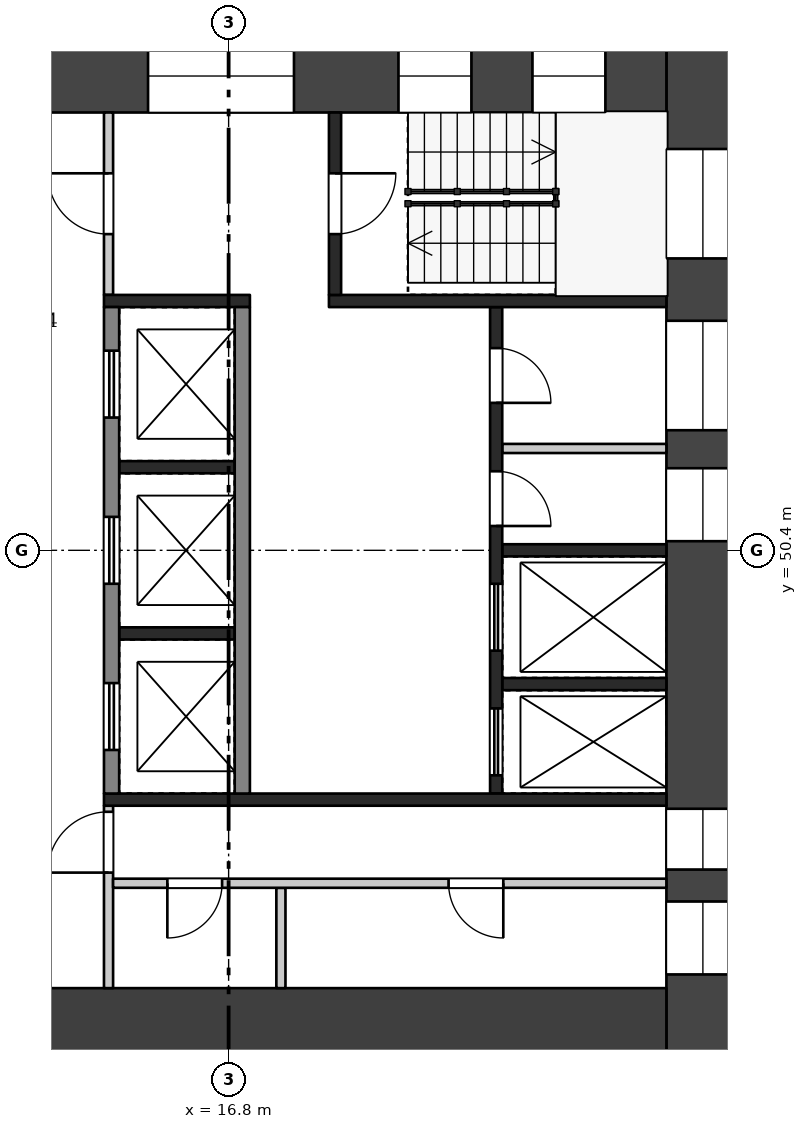
"""IFC4 building model, lengths in metres.
Left out: names, types, materials, properties, quantities, classifications, styles, units other than length and angle.
Written with IfcOpenShell. Run it as: python <this file> out.ifc"""

import sys

from ifc_helpers import new_model, si_unit, direction, frame, frame_2d, origin, place, context, subcontext, project, spatial, rectangle, extrude, element, fill, save


model = new_model("IFC4")
c1 = context("Model", 3, precision=1e-05, world=origin(), true_north=direction((0.0, 1.0)))
c2 = subcontext(c1, "Body", "Model", "MODEL_VIEW")
j1 = project(units=[si_unit("LENGTHUNIT", "METRE"), si_unit("PLANEANGLEUNIT", "RADIAN")], contexts=[c1])
p1 = place(None, origin())
s1 = spatial("IfcSite", under=j1, at=p1, CompositionType="ELEMENT")
p2 = place(p1, origin())
s2 = spatial("IfcBuilding", under=s1, at=p2, CompositionType="ELEMENT")
p3 = place(p2, frame((0.0, 0.0, 200.2)))
s3 = spatial("IfcBuildingStorey", under=s2, at=p3, CompositionType="ELEMENT", Elevation=200.2)
p4 = place(p3, frame((24.6, 58.8, 0.0), z_axis=(0.0, 0.0, 1.0), x_axis=(0.0, -1.0, 0.0)))
e1 = element("IfcWall", 1, at=p4, inside=s3, PredefinedType="SHEAR", context=c2, shape_type="SweptSolid", body=[
    extrude(rectangle(XDim=16.8, YDim=1.2, at=frame_2d((8.4, 0.0))), origin(), (0.0, 0.0, 1.0), 3.22),
])
p5 = place(p4, frame((1.8, 0.0, 0.5)))
e2 = element("IfcOpeningElement", 2, at=p5, cuts=e1, PredefinedType="OPENING", context=c2, shape_type="SweptSolid", body=[
    extrude(rectangle(XDim=1.8, YDim=2.4, at=frame_2d((0.9, 1.2))), frame((0.0, 0.61, 0.0), z_axis=(0.0, -1.0, 0.0), x_axis=(1.0, 0.0, 0.0)), (0.0, 0.0, 1.0), 1.22),
])
p6 = place(p4, frame((4.625, 0.0, 1.6)))
e3 = element("IfcOpeningElement", 3, at=p6, cuts=e1, PredefinedType="OPENING", context=c2, shape_type="SweptSolid", body=[
    extrude(rectangle(XDim=1.8, YDim=1.2, at=frame_2d((0.9, 0.6))), frame((0.0, 0.61, 0.0), z_axis=(0.0, -1.0, 0.0), x_axis=(1.0, 0.0, 0.0)), (0.0, 0.0, 1.0), 1.22),
])
p7 = place(p4, frame((7.05, 0.0, 1.6)))
e4 = element("IfcOpeningElement", 4, at=p7, cuts=e1, PredefinedType="OPENING", context=c2, shape_type="SweptSolid", body=[
    extrude(rectangle(XDim=1.2, YDim=1.2, at=frame_2d((0.6, 0.6))), frame((0.0, 0.61, 0.0), z_axis=(0.0, -1.0, 0.0), x_axis=(1.0, 0.0, 0.0)), (0.0, 0.0, 1.0), 1.22),
])
p8 = place(p4, frame((12.65, 0.0, 0.6)))
e5 = element("IfcOpeningElement", 5, at=p8, cuts=e1, PredefinedType="OPENING", context=c2, shape_type="SweptSolid", body=[
    extrude(rectangle(XDim=1.0, YDim=2.1, at=frame_2d((0.5, 1.05))), frame((0.0, 0.61, 0.0), z_axis=(0.0, -1.0, 0.0), x_axis=(1.0, 0.0, 0.0)), (0.0, 0.0, 1.0), 1.22),
])
p9 = place(p4, frame((14.175, 0.0, 1.6)))
e6 = element("IfcOpeningElement", 6, at=p9, cuts=e1, PredefinedType="OPENING", context=c2, shape_type="SweptSolid", body=[
    extrude(rectangle(XDim=1.2, YDim=1.2, at=frame_2d((0.6, 0.6))), frame((0.0, 0.61, 0.0), z_axis=(0.0, -1.0, 0.0), x_axis=(1.0, 0.0, 0.0)), (0.0, 0.0, 1.0), 1.22),
])
p10 = place(p3, frame((9.6, 58.2, 0.0), z_axis=(0.0, 0.0, 1.0), x_axis=(1.0, 0.0, 0.0)))
e7 = element("IfcWall", 7, at=p10, inside=s3, PredefinedType="SHEAR", context=c2, shape_type="SweptSolid", body=[
    extrude(rectangle(XDim=14.4, YDim=1.2, at=frame_2d((7.2, 0.0))), origin(), (0.0, 0.0, 1.0), 3.22),
])
p11 = place(p10, frame((1.105, 0.0, 0.6)))
e8 = element("IfcOpeningElement", 8, at=p11, cuts=e7, PredefinedType="OPENING", context=c2, shape_type="SweptSolid", body=[
    extrude(rectangle(XDim=3.0, YDim=2.1, at=frame_2d((1.5, 1.05))), frame((0.0, 0.61, 0.0), z_axis=(0.0, -1.0, 0.0), x_axis=(1.0, 0.0, 0.0)), (0.0, 0.0, 1.0), 1.22),
])
p12 = place(p10, frame((5.875, 0.0, 0.6)))
e9 = element("IfcOpeningElement", 9, at=p12, cuts=e7, PredefinedType="OPENING", context=c2, shape_type="SweptSolid", body=[
    extrude(rectangle(XDim=2.4, YDim=2.1, at=frame_2d((1.2, 1.05))), frame((0.0, 0.61, 0.0), z_axis=(0.0, -1.0, 0.0), x_axis=(1.0, 0.0, 0.0)), (0.0, 0.0, 1.0), 1.22),
])
p13 = place(p10, frame((9.993, 0.0, 0.5)))
e10 = element("IfcOpeningElement", 10, at=p13, cuts=e7, PredefinedType="OPENING", context=c2, shape_type="SweptSolid", body=[
    extrude(rectangle(XDim=1.2, YDim=2.4, at=frame_2d((0.6, 1.2))), frame((0.0, 0.61, 0.0), z_axis=(0.0, -1.0, 0.0), x_axis=(1.0, 0.0, 0.0)), (0.0, 0.0, 1.0), 1.22),
])
p14 = place(p10, frame((12.197, 0.0, 0.5)))
e11 = element("IfcOpeningElement", 11, at=p14, cuts=e7, PredefinedType="OPENING", context=c2, shape_type="SweptSolid", body=[
    extrude(rectangle(XDim=1.2, YDim=2.4, at=frame_2d((0.6, 1.2))), frame((0.0, 0.61, 0.0), z_axis=(0.0, -1.0, 0.0), x_axis=(1.0, 0.0, 0.0)), (0.0, 0.0, 1.0), 1.22),
])
p15 = place(p3, frame((9.6, 42.6, 0.0), z_axis=(0.0, 0.0, 1.0), x_axis=(1.0, 0.0, 0.0)))
e12 = element("IfcWall", 12, at=p15, inside=s3, PredefinedType="SHEAR", context=c2, shape_type="SweptSolid", body=[
    extrude(rectangle(XDim=14.4, YDim=1.2, at=frame_2d((7.2, 0.0))), origin(), (0.0, 0.0, 1.0), 3.22),
])
p16 = place(p15, frame((2.1, 0.0, 0.0)))
e13 = element("IfcOpeningElement", 13, at=p16, cuts=e12, PredefinedType="OPENING", context=c2, shape_type="SweptSolid", body=[
    extrude(rectangle(XDim=1.8, YDim=2.1, at=frame_2d((0.9, 1.05))), frame((0.0, 0.61, 0.0), z_axis=(0.0, -1.0, 0.0), x_axis=(1.0, 0.0, 0.0)), (0.0, 0.0, 1.0), 1.22),
])
for number, where, z_axis, x_axis in (
    (14, (15.0, 51.767, 0.0), (0.0, 0.0, 1.0), (1.0, 0.0, 0.0)),
    (15, (15.0, 49.033, 0.0), (0.0, 0.0, 1.0), (1.0, 0.0, 0.0)),
):
    element("IfcWall", number, at=place(p3, frame(where, z_axis=z_axis, x_axis=x_axis)), inside=s3, PredefinedType="SHEAR", context=c2, shape_type="SweptSolid", body=[
        extrude(rectangle(XDim=1.9, YDim=0.2, at=frame_2d((0.95, 0.0))), origin(), (0.0, 0.0, 1.0), 3.22),
    ])
p17 = place(p3, frame((14.875, 54.4, 0.0), z_axis=(0.0, 0.0, 1.0), x_axis=(0.0, -1.0, 0.0)))
e16 = element("IfcWall", 16, at=p17, inside=s3, PredefinedType="SHEAR", context=c2, shape_type="SweptSolid", body=[
    extrude(rectangle(XDim=8.0, YDim=0.25, at=frame_2d((4.0, 0.0))), origin(), (0.0, 0.0, 1.0), 3.22),
])
p18 = place(p17, frame((0.717, 0.0, 0.0)))
e17 = element("IfcOpeningElement", 17, at=p18, cuts=e16, PredefinedType="OPENING", context=c2, shape_type="SweptSolid", body=[
    extrude(rectangle(XDim=1.1, YDim=2.1, at=frame_2d((0.55, 1.05))), frame((0.0, 0.135, 0.0), z_axis=(0.0, -1.0, 0.0), x_axis=(1.0, 0.0, 0.0)), (0.0, 0.0, 1.0), 0.27),
])
p19 = place(p17, frame((3.45, 0.0, 0.0)))
e18 = element("IfcOpeningElement", 18, at=p19, cuts=e16, PredefinedType="OPENING", context=c2, shape_type="SweptSolid", body=[
    extrude(rectangle(XDim=1.1, YDim=2.1, at=frame_2d((0.55, 1.05))), frame((0.0, 0.135, 0.0), z_axis=(0.0, -1.0, 0.0), x_axis=(1.0, 0.0, 0.0)), (0.0, 0.0, 1.0), 0.27),
])
p20 = place(p17, frame((6.183, 0.0, 0.0)))
e19 = element("IfcOpeningElement", 19, at=p20, cuts=e16, PredefinedType="OPENING", context=c2, shape_type="SweptSolid", body=[
    extrude(rectangle(XDim=1.1, YDim=2.1, at=frame_2d((0.55, 1.05))), frame((0.0, 0.135, 0.0), z_axis=(0.0, -1.0, 0.0), x_axis=(1.0, 0.0, 0.0)), (0.0, 0.0, 1.0), 0.27),
])
p21 = place(p3, frame((17.025, 54.4, 0.0), z_axis=(0.0, 0.0, 1.0), x_axis=(0.0, -1.0, 0.0)))
e20 = element("IfcWall", 20, at=p21, inside=s3, PredefinedType="SHEAR", context=c2, shape_type="SweptSolid", body=[
    extrude(rectangle(XDim=8.0, YDim=0.25, at=frame_2d((4.0, 0.0))), origin(), (0.0, 0.0, 1.0), 3.22),
])
for number, where, z_axis, x_axis in (
    (21, (21.3, 50.4, 0.0), (0.0, 0.0, 1.0), (1.0, 0.0, 0.0)),
    (22, (21.3, 48.2, 0.0), (0.0, 0.0, 1.0), (1.0, 0.0, 0.0)),
):
    element("IfcWall", number, at=place(p3, frame(where, z_axis=z_axis, x_axis=x_axis)), inside=s3, PredefinedType="SHEAR", context=c2, shape_type="SweptSolid", body=[
        extrude(rectangle(XDim=2.7, YDim=0.2, at=frame_2d((1.35, 0.0))), origin(), (0.0, 0.0, 1.0), 3.22),
    ])
p22 = place(p3, frame((21.3, 52.075, 0.0), z_axis=(0.0, 0.0, 1.0), x_axis=(1.0, 0.0, 0.0)))
e23 = element("IfcWall", 23, at=p22, inside=s3, PredefinedType="PARTITIONING", context=c2, shape_type="SweptSolid", body=[
    extrude(rectangle(XDim=2.7, YDim=0.15, at=frame_2d((1.35, 0.0))), origin(), (0.0, 0.0, 1.0), 3.22),
])
p23 = place(p3, frame((21.2, 54.4, 0.0), z_axis=(0.0, 0.0, 1.0), x_axis=(0.0, -1.0, 0.0)))
e24 = element("IfcWall", 24, at=p23, inside=s3, PredefinedType="SHEAR", context=c2, shape_type="SweptSolid", body=[
    extrude(rectangle(XDim=8.0, YDim=0.2, at=frame_2d((4.0, 0.0))), origin(), (0.0, 0.0, 1.0), 3.22),
])
p24 = place(p23, frame((0.675, 0.0, 0.0)))
e25 = element("IfcOpeningElement", 25, at=p24, cuts=e24, PredefinedType="OPENING", context=c2, shape_type="SweptSolid", body=[
    extrude(rectangle(XDim=0.9, YDim=2.1, at=frame_2d((0.45, 1.05))), frame((0.0, 0.11, 0.0), z_axis=(0.0, -1.0, 0.0), x_axis=(1.0, 0.0, 0.0)), (0.0, 0.0, 1.0), 0.22),
])
p25 = place(p23, frame((2.7, 0.0, 0.0)))
e26 = element("IfcOpeningElement", 26, at=p25, cuts=e24, PredefinedType="OPENING", context=c2, shape_type="SweptSolid", body=[
    extrude(rectangle(XDim=0.9, YDim=2.1, at=frame_2d((0.45, 1.05))), frame((0.0, 0.11, 0.0), z_axis=(0.0, -1.0, 0.0), x_axis=(1.0, 0.0, 0.0)), (0.0, 0.0, 1.0), 0.22),
])
p26 = place(p23, frame((4.55, 0.0, 0.0)))
e27 = element("IfcOpeningElement", 27, at=p26, cuts=e24, PredefinedType="OPENING", context=c2, shape_type="SweptSolid", body=[
    extrude(rectangle(XDim=1.1, YDim=2.1, at=frame_2d((0.55, 1.05))), frame((0.0, 0.11, 0.0), z_axis=(0.0, -1.0, 0.0), x_axis=(1.0, 0.0, 0.0)), (0.0, 0.0, 1.0), 0.22),
])
p27 = place(p23, frame((6.6, 0.0, 0.0)))
e28 = element("IfcOpeningElement", 28, at=p27, cuts=e24, PredefinedType="OPENING", context=c2, shape_type="SweptSolid", body=[
    extrude(rectangle(XDim=1.1, YDim=2.1, at=frame_2d((0.55, 1.05))), frame((0.0, 0.11, 0.0), z_axis=(0.0, -1.0, 0.0), x_axis=(1.0, 0.0, 0.0)), (0.0, 0.0, 1.0), 0.22),
])
p28 = place(p3, frame((14.75, 54.5, 0.0), z_axis=(0.0, 0.0, 1.0), x_axis=(1.0, 0.0, 0.0)))
e29 = element("IfcWall", 29, at=p28, inside=s3, PredefinedType="SHEAR", context=c2, shape_type="SweptSolid", body=[
    extrude(rectangle(XDim=2.4, YDim=0.2, at=frame_2d((1.2, 0.0))), origin(), (0.0, 0.0, 1.0), 3.22),
])
p29 = place(p3, frame((18.45, 54.5, 0.0), z_axis=(0.0, 0.0, 1.0), x_axis=(1.0, 0.0, 0.0)))
e30 = element("IfcWall", 30, at=p29, inside=s3, PredefinedType="SHEAR", context=c2, shape_type="SweptSolid", body=[
    extrude(rectangle(XDim=5.55, YDim=0.2, at=frame_2d((2.775, 0.0))), origin(), (0.0, 0.0, 1.0), 3.22),
])
p30 = place(p3, frame((14.825, 57.6, 0.0), z_axis=(0.0, 0.0, 1.0), x_axis=(0.0, -1.0, 0.0)))
e31 = element("IfcWall", 31, at=p30, inside=s3, PredefinedType="PARTITIONING", context=c2, shape_type="SweptSolid", body=[
    extrude(rectangle(XDim=3.0, YDim=0.15, at=frame_2d((1.5, 0.0))), origin(), (0.0, 0.0, 1.0), 3.22),
])
p31 = place(p30, frame((1.0, 0.0, 0.0)))
e32 = element("IfcOpeningElement", 32, at=p31, cuts=e31, PredefinedType="OPENING", context=c2, shape_type="SweptSolid", body=[
    extrude(rectangle(XDim=1.0, YDim=2.1, at=frame_2d((0.5, 1.05))), frame((0.0, 0.085, 0.0), z_axis=(0.0, -1.0, 0.0), x_axis=(1.0, 0.0, 0.0)), (0.0, 0.0, 1.0), 0.17),
])
p32 = place(p3, frame((18.55, 57.6, 0.0), z_axis=(0.0, 0.0, 1.0), x_axis=(0.0, -1.0, 0.0)))
e33 = element("IfcWall", 33, at=p32, inside=s3, PredefinedType="SHEAR", context=c2, shape_type="SweptSolid", body=[
    extrude(rectangle(XDim=3.0, YDim=0.2, at=frame_2d((1.5, 0.0))), origin(), (0.0, 0.0, 1.0), 3.22),
])
p33 = place(p32, frame((1.0, 0.0, 0.0)))
e34 = element("IfcOpeningElement", 34, at=p33, cuts=e33, PredefinedType="OPENING", context=c2, shape_type="SweptSolid", body=[
    extrude(rectangle(XDim=1.0, YDim=2.1, at=frame_2d((0.5, 1.05))), frame((0.0, 0.11, 0.0), z_axis=(0.0, -1.0, 0.0), x_axis=(1.0, 0.0, 0.0)), (0.0, 0.0, 1.0), 0.22),
])
p34 = place(p3, frame((14.75, 46.3, 0.0), z_axis=(0.0, 0.0, 1.0), x_axis=(1.0, 0.0, 0.0)))
e35 = element("IfcWall", 35, at=p34, inside=s3, PredefinedType="SHEAR", context=c2, shape_type="SweptSolid", body=[
    extrude(rectangle(XDim=9.25, YDim=0.2, at=frame_2d((4.625, 0.0))), origin(), (0.0, 0.0, 1.0), 3.22),
])
p35 = place(p3, frame((14.825, 46.2, 0.0), z_axis=(0.0, 0.0, 1.0), x_axis=(0.0, -1.0, 0.0)))
e36 = element("IfcWall", 36, at=p35, inside=s3, PredefinedType="PARTITIONING", context=c2, shape_type="SweptSolid", body=[
    extrude(rectangle(XDim=3.0, YDim=0.15, at=frame_2d((1.5, 0.0))), origin(), (0.0, 0.0, 1.0), 3.22),
])
p36 = place(p35, frame((0.1, 0.0, 0.0)))
e37 = element("IfcOpeningElement", 37, at=p36, cuts=e36, PredefinedType="OPENING", context=c2, shape_type="SweptSolid", body=[
    extrude(rectangle(XDim=1.0, YDim=2.1, at=frame_2d((0.5, 1.05))), frame((0.0, 0.085, 0.0), z_axis=(0.0, -1.0, 0.0), x_axis=(1.0, 0.0, 0.0)), (0.0, 0.0, 1.0), 0.17),
])
p37 = place(p3, frame((17.66, 44.85, 0.0), z_axis=(0.0, 0.0, 1.0), x_axis=(0.0, -1.0, 0.0)))
e38 = element("IfcWall", 38, at=p37, inside=s3, PredefinedType="PARTITIONING", context=c2, shape_type="SweptSolid", body=[
    extrude(rectangle(XDim=1.65, YDim=0.15, at=frame_2d((0.825, 0.0))), origin(), (0.0, 0.0, 1.0), 3.22),
])
p38 = place(p3, frame((14.9, 44.925, 0.0), z_axis=(0.0, 0.0, 1.0), x_axis=(1.0, 0.0, 0.0)))
e39 = element("IfcWall", 39, at=p38, inside=s3, PredefinedType="PARTITIONING", context=c2, shape_type="SweptSolid", body=[
    extrude(rectangle(XDim=9.1, YDim=0.15, at=frame_2d((4.55, 0.0))), origin(), (0.0, 0.0, 1.0), 3.22),
])
p39 = place(p38, frame((0.893, 0.0, 0.0)))
e40 = element("IfcOpeningElement", 40, at=p39, cuts=e39, PredefinedType="OPENING", context=c2, shape_type="SweptSolid", body=[
    extrude(rectangle(XDim=0.9, YDim=2.1, at=frame_2d((0.45, 1.05))), frame((0.0, 0.085, 0.0), z_axis=(0.0, -1.0, 0.0), x_axis=(1.0, 0.0, 0.0)), (0.0, 0.0, 1.0), 0.17),
])
p40 = place(p38, frame((5.518, 0.0, 0.0)))
e41 = element("IfcOpeningElement", 41, at=p40, cuts=e39, PredefinedType="OPENING", context=c2, shape_type="SweptSolid", body=[
    extrude(rectangle(XDim=0.9, YDim=2.1, at=frame_2d((0.45, 1.05))), frame((0.0, 0.085, 0.0), z_axis=(0.0, -1.0, 0.0), x_axis=(1.0, 0.0, 0.0)), (0.0, 0.0, 1.0), 0.17),
])
p41 = place(p18, origin())
e42 = element("IfcDoor", 42, at=p41, inside=s3, OperationType="DOUBLE_DOOR_SLIDING", PredefinedType="DOOR", context=c2, shape_type="SweptSolid", body=[
    extrude(rectangle(XDim=1.1, YDim=2.1, at=frame_2d((0.55, 1.05))), frame((0.0, 0.025, 0.0), z_axis=(0.0, -1.0, 0.0), x_axis=(1.0, 0.0, 0.0)), (0.0, 0.0, 1.0), 0.05),
])
fill(e17, e42)
p42 = place(p19, origin())
e43 = element("IfcDoor", 43, at=p42, inside=s3, OperationType="DOUBLE_DOOR_SLIDING", PredefinedType="DOOR", context=c2, shape_type="SweptSolid", body=[
    extrude(rectangle(XDim=1.1, YDim=2.1, at=frame_2d((0.55, 1.05))), frame((0.0, 0.025, 0.0), z_axis=(0.0, -1.0, 0.0), x_axis=(1.0, 0.0, 0.0)), (0.0, 0.0, 1.0), 0.05),
])
fill(e18, e43)
p43 = place(p20, origin())
e44 = element("IfcDoor", 44, at=p43, inside=s3, OperationType="DOUBLE_DOOR_SLIDING", PredefinedType="DOOR", context=c2, shape_type="SweptSolid", body=[
    extrude(rectangle(XDim=1.1, YDim=2.1, at=frame_2d((0.55, 1.05))), frame((0.0, 0.025, 0.0), z_axis=(0.0, -1.0, 0.0), x_axis=(1.0, 0.0, 0.0)), (0.0, 0.0, 1.0), 0.05),
])
fill(e19, e44)
p44 = place(p24, origin())
e45 = element("IfcDoor", 45, at=p44, inside=s3, OperationType="SINGLE_SWING_RIGHT", PredefinedType="DOOR", context=c2, shape_type="SweptSolid", body=[
    extrude(rectangle(XDim=0.9, YDim=2.1, at=frame_2d((0.45, 1.05))), frame((0.0, 0.025, 0.0), z_axis=(0.0, -1.0, 0.0), x_axis=(1.0, 0.0, 0.0)), (0.0, 0.0, 1.0), 0.05),
])
fill(e25, e45)
p45 = place(p25, origin())
e46 = element("IfcDoor", 46, at=p45, inside=s3, OperationType="SINGLE_SWING_RIGHT", PredefinedType="DOOR", context=c2, shape_type="SweptSolid", body=[
    extrude(rectangle(XDim=0.9, YDim=2.1, at=frame_2d((0.45, 1.05))), frame((0.0, 0.025, 0.0), z_axis=(0.0, -1.0, 0.0), x_axis=(1.0, 0.0, 0.0)), (0.0, 0.0, 1.0), 0.05),
])
fill(e26, e46)
p46 = place(p26, origin())
e47 = element("IfcDoor", 47, at=p46, inside=s3, OperationType="DOUBLE_DOOR_SLIDING", PredefinedType="DOOR", context=c2, shape_type="SweptSolid", body=[
    extrude(rectangle(XDim=1.1, YDim=2.1, at=frame_2d((0.55, 1.05))), frame((0.0, 0.025, 0.0), z_axis=(0.0, -1.0, 0.0), x_axis=(1.0, 0.0, 0.0)), (0.0, 0.0, 1.0), 0.05),
])
fill(e27, e47)
p47 = place(p27, origin())
e48 = element("IfcDoor", 48, at=p47, inside=s3, OperationType="DOUBLE_DOOR_SLIDING", PredefinedType="DOOR", context=c2, shape_type="SweptSolid", body=[
    extrude(rectangle(XDim=1.1, YDim=2.1, at=frame_2d((0.55, 1.05))), frame((0.0, 0.025, 0.0), z_axis=(0.0, -1.0, 0.0), x_axis=(1.0, 0.0, 0.0)), (0.0, 0.0, 1.0), 0.05),
])
fill(e28, e48)
p48 = place(p31, frame((1.0, 0.0, 0.0), z_axis=(0.0, 0.0, 1.0), x_axis=(-1.0, 0.0, 0.0)))
e49 = element("IfcDoor", 49, at=p48, inside=s3, OperationType="SINGLE_SWING_RIGHT", PredefinedType="DOOR", context=c2, shape_type="SweptSolid", body=[
    extrude(rectangle(XDim=1.0, YDim=2.1, at=frame_2d((0.5, 1.05))), frame((0.0, 0.025, 0.0), z_axis=(0.0, -1.0, 0.0), x_axis=(1.0, 0.0, 0.0)), (0.0, 0.0, 1.0), 0.05),
])
fill(e32, e49)
p49 = place(p33, origin())
e50 = element("IfcDoor", 50, at=p49, inside=s3, OperationType="SINGLE_SWING_LEFT", PredefinedType="DOOR", context=c2, shape_type="SweptSolid", body=[
    extrude(rectangle(XDim=1.0, YDim=2.1, at=frame_2d((0.5, 1.05))), frame((0.0, 0.025, 0.0), z_axis=(0.0, -1.0, 0.0), x_axis=(1.0, 0.0, 0.0)), (0.0, 0.0, 1.0), 0.05),
])
fill(e34, e50)
p50 = place(p36, frame((1.0, 0.0, 0.0), z_axis=(0.0, 0.0, 1.0), x_axis=(-1.0, 0.0, 0.0)))
e51 = element("IfcDoor", 51, at=p50, inside=s3, OperationType="SINGLE_SWING_LEFT", PredefinedType="DOOR", context=c2, shape_type="SweptSolid", body=[
    extrude(rectangle(XDim=1.0, YDim=2.1, at=frame_2d((0.5, 1.05))), frame((0.0, 0.025, 0.0), z_axis=(0.0, -1.0, 0.0), x_axis=(1.0, 0.0, 0.0)), (0.0, 0.0, 1.0), 0.05),
])
fill(e37, e51)
p51 = place(p39, frame((0.9, 0.0, 0.0), z_axis=(0.0, 0.0, 1.0), x_axis=(-1.0, 0.0, 0.0)))
e52 = element("IfcDoor", 52, at=p51, inside=s3, OperationType="SINGLE_SWING_RIGHT", PredefinedType="DOOR", context=c2, shape_type="SweptSolid", body=[
    extrude(rectangle(XDim=0.9, YDim=2.1, at=frame_2d((0.45, 1.05))), frame((0.0, 0.025, 0.0), z_axis=(0.0, -1.0, 0.0), x_axis=(1.0, 0.0, 0.0)), (0.0, 0.0, 1.0), 0.05),
])
fill(e40, e52)
p52 = place(p40, frame((0.9, 0.0, 0.0), z_axis=(0.0, 0.0, 1.0), x_axis=(-1.0, 0.0, 0.0)))
e53 = element("IfcDoor", 53, at=p52, inside=s3, OperationType="SINGLE_SWING_LEFT", PredefinedType="DOOR", context=c2, shape_type="SweptSolid", body=[
    extrude(rectangle(XDim=0.9, YDim=2.1, at=frame_2d((0.45, 1.05))), frame((0.0, 0.025, 0.0), z_axis=(0.0, -1.0, 0.0), x_axis=(1.0, 0.0, 0.0)), (0.0, 0.0, 1.0), 0.05),
])
fill(e41, e53)
p53 = place(p5, origin())
e54 = element("IfcWindow", 54, at=p53, inside=s3, PartitioningType="SINGLE_PANEL", PredefinedType="WINDOW", context=c2, shape_type="SweptSolid", body=[
    extrude(rectangle(XDim=1.8, YDim=2.4, at=frame_2d((0.9, 1.2))), frame((0.0, 0.03, 0.0), z_axis=(0.0, -1.0, 0.0), x_axis=(1.0, 0.0, 0.0)), (0.0, 0.0, 1.0), 0.06),
])
fill(e2, e54)
p54 = place(p6, origin())
e55 = element("IfcWindow", 55, at=p54, inside=s3, PartitioningType="SINGLE_PANEL", PredefinedType="WINDOW", context=c2, shape_type="SweptSolid", body=[
    extrude(rectangle(XDim=1.8, YDim=1.2, at=frame_2d((0.9, 0.6))), frame((0.0, 0.03, 0.0), z_axis=(0.0, -1.0, 0.0), x_axis=(1.0, 0.0, 0.0)), (0.0, 0.0, 1.0), 0.06),
])
fill(e3, e55)
p55 = place(p7, origin())
e56 = element("IfcWindow", 56, at=p55, inside=s3, PartitioningType="SINGLE_PANEL", PredefinedType="WINDOW", context=c2, shape_type="SweptSolid", body=[
    extrude(rectangle(XDim=1.2, YDim=1.2, at=frame_2d((0.6, 0.6))), frame((0.0, 0.03, 0.0), z_axis=(0.0, -1.0, 0.0), x_axis=(1.0, 0.0, 0.0)), (0.0, 0.0, 1.0), 0.06),
])
fill(e4, e56)
p56 = place(p8, origin())
e57 = element("IfcWindow", 57, at=p56, inside=s3, PartitioningType="SINGLE_PANEL", PredefinedType="WINDOW", context=c2, shape_type="SweptSolid", body=[
    extrude(rectangle(XDim=1.0, YDim=2.1, at=frame_2d((0.5, 1.05))), frame((0.0, 0.03, 0.0), z_axis=(0.0, -1.0, 0.0), x_axis=(1.0, 0.0, 0.0)), (0.0, 0.0, 1.0), 0.06),
])
fill(e5, e57)
p57 = place(p9, origin())
e58 = element("IfcWindow", 58, at=p57, inside=s3, PartitioningType="SINGLE_PANEL", PredefinedType="WINDOW", context=c2, shape_type="SweptSolid", body=[
    extrude(rectangle(XDim=1.2, YDim=1.2, at=frame_2d((0.6, 0.6))), frame((0.0, 0.03, 0.0), z_axis=(0.0, -1.0, 0.0), x_axis=(1.0, 0.0, 0.0)), (0.0, 0.0, 1.0), 0.06),
])
fill(e6, e58)
p58 = place(p12, origin())
e59 = element("IfcWindow", 59, at=p58, inside=s3, PartitioningType="SINGLE_PANEL", PredefinedType="WINDOW", context=c2, shape_type="SweptSolid", body=[
    extrude(rectangle(XDim=2.4, YDim=2.1, at=frame_2d((1.2, 1.05))), frame((0.0, 0.03, 0.0), z_axis=(0.0, -1.0, 0.0), x_axis=(1.0, 0.0, 0.0)), (0.0, 0.0, 1.0), 0.06),
])
fill(e9, e59)
p59 = place(p13, origin())
e60 = element("IfcWindow", 60, at=p59, inside=s3, PartitioningType="SINGLE_PANEL", PredefinedType="WINDOW", context=c2, shape_type="SweptSolid", body=[
    extrude(rectangle(XDim=1.2, YDim=2.4, at=frame_2d((0.6, 1.2))), frame((0.0, 0.03, 0.0), z_axis=(0.0, -1.0, 0.0), x_axis=(1.0, 0.0, 0.0)), (0.0, 0.0, 1.0), 0.06),
])
fill(e10, e60)
p60 = place(p14, origin())
e61 = element("IfcWindow", 61, at=p60, inside=s3, PartitioningType="SINGLE_PANEL", PredefinedType="WINDOW", context=c2, shape_type="SweptSolid", body=[
    extrude(rectangle(XDim=1.2, YDim=2.4, at=frame_2d((0.6, 1.2))), frame((0.0, 0.03, 0.0), z_axis=(0.0, -1.0, 0.0), x_axis=(1.0, 0.0, 0.0)), (0.0, 0.0, 1.0), 0.06),
])
fill(e11, e61)
save(model, sys.argv[1])
